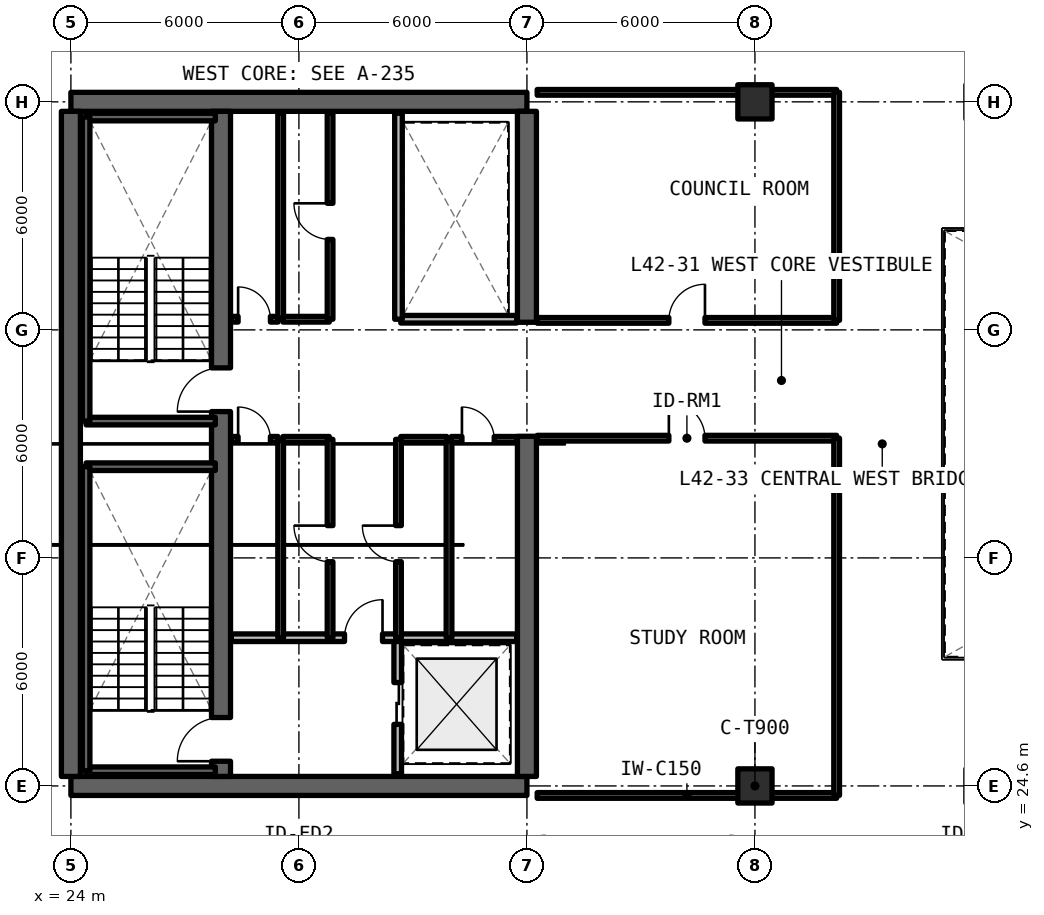
"""IFC4 building model, lengths in metres.
Left out: names, types, materials, properties, quantities, classifications, styles, units other than length and angle.
Written with IfcOpenShell. Run it as: python <this file> out.ifc"""

import sys

from ifc_helpers import new_model, si_unit, direction, frame, frame_2d, origin, origin_2d, place, context, subcontext, project, spatial, rectangle, extrude, element, fill, save


model = new_model("IFC4")
c1 = context("Model", 3, precision=1e-05, world=origin(), true_north=direction((0.0, 1.0)))
c2 = subcontext(c1, "Body", "Model", "MODEL_VIEW")
j1 = project(units=[si_unit("LENGTHUNIT", "METRE"), si_unit("PLANEANGLEUNIT", "RADIAN")], contexts=[c1])
p1 = place(None, origin())
s1 = spatial("IfcSite", under=j1, at=p1, CompositionType="ELEMENT")
p2 = place(p1, origin())
s2 = spatial("IfcBuilding", under=s1, at=p2, CompositionType="ELEMENT")
p3 = place(p2, frame((0.0, 0.0, 151.8)))
s3 = spatial("IfcBuildingStorey", under=s2, at=p3, CompositionType="ELEMENT", Elevation=151.8)
for number, where, z_axis, x_axis in (
    (1, (24.0, 24.6, 0.0), (0.0, 0.0, 1.0), (1.0, 0.0, 0.0)),
    (2, (36.0, 42.6, 0.0), (0.0, 0.0, 1.0), (-1.0, 0.0, 0.0)),
):
    element("IfcWall", number, at=place(p3, frame(where, z_axis=z_axis, x_axis=x_axis)), inside=s3, PredefinedType="SHEAR", context=c2, shape_type="SweptSolid", body=[
        extrude(rectangle(XDim=12.0, YDim=0.5, at=frame_2d((6.0, 0.0))), origin(), (0.0, 0.0, 1.0), 3.3),
    ])
p4 = place(p3, frame((24.0, 24.85, 0.0), z_axis=(0.0, 0.0, 1.0), x_axis=(0.0, 1.0, 0.0)))
e3 = element("IfcWall", 3, at=p4, inside=s3, PredefinedType="SHEAR", context=c2, shape_type="SweptSolid", body=[
    extrude(rectangle(XDim=17.5, YDim=0.5, at=frame_2d((8.75, 0.0))), origin(), (0.0, 0.0, 1.0), 3.3),
])
p5 = place(p3, frame((36.0, 24.85, 0.0), z_axis=(0.0, 0.0, 1.0), x_axis=(0.0, 1.0, 0.0)))
e4 = element("IfcWall", 4, at=p5, inside=s3, PredefinedType="SHEAR", context=c2, shape_type="SweptSolid", body=[
    extrude(rectangle(XDim=8.95, YDim=0.5, at=frame_2d((4.475, 0.0))), origin(), (0.0, 0.0, 1.0), 3.3),
])
p6 = place(p3, frame((36.0, 36.8, 0.0), z_axis=(0.0, 0.0, 1.0), x_axis=(0.0, 1.0, 0.0)))
e5 = element("IfcWall", 5, at=p6, inside=s3, PredefinedType="SHEAR", context=c2, shape_type="SweptSolid", body=[
    extrude(rectangle(XDim=5.55, YDim=0.5, at=frame_2d((2.775, 0.0))), origin(), (0.0, 0.0, 1.0), 3.3),
])
p7 = place(p3, frame((27.95, 24.85, 0.0), z_axis=(0.0, 0.0, 1.0), x_axis=(0.0, 1.0, 0.0)))
e6 = element("IfcWall", 6, at=p7, inside=s3, PredefinedType="SHEAR", context=c2, shape_type="SweptSolid", body=[
    extrude(rectangle(XDim=17.5, YDim=0.5, at=frame_2d((8.75, 0.0))), origin(), (0.0, 0.0, 1.0), 3.3),
])
p8 = place(p7, frame((0.4, 0.0, 0.0)))
e7 = element("IfcOpeningElement", 7, at=p8, cuts=e6, PredefinedType="OPENING", context=c2, shape_type="SweptSolid", body=[
    extrude(rectangle(XDim=1.15, YDim=2.15, at=frame_2d((0.575, 1.075))), frame((0.0, 0.26, 0.0), z_axis=(0.0, -1.0, 0.0), x_axis=(1.0, 0.0, 0.0)), (0.0, 0.0, 1.0), 0.52),
])
p9 = place(p7, frame((9.6, 0.0, 0.0)))
e8 = element("IfcOpeningElement", 8, at=p9, cuts=e6, PredefinedType="OPENING", context=c2, shape_type="SweptSolid", body=[
    extrude(rectangle(XDim=1.15, YDim=2.15, at=frame_2d((0.575, 1.075))), frame((0.0, 0.26, 0.0), z_axis=(0.0, -1.0, 0.0), x_axis=(1.0, 0.0, 0.0)), (0.0, 0.0, 1.0), 0.52),
])
for number, where, z_axis, x_axis in (
    (9, (42.0, 24.6, 0.0), (0.0, 0.0, 1.0), (1.0, 0.0, 0.0)),
    (10, (42.0, 42.6, 0.0), (0.0, 0.0, 1.0), (1.0, 0.0, 0.0)),
):
    element("IfcColumn", number, at=place(p3, frame(where, z_axis=z_axis, x_axis=x_axis)), inside=s3, PredefinedType="COLUMN", context=c2, shape_type="SweptSolid", body=[
        extrude(rectangle(XDim=0.9, YDim=0.9, at=origin_2d()), origin(), (0.0, 0.0, 1.0), 3.3),
    ])
p10 = place(p3, frame((32.6, 24.92, 0.0), z_axis=(0.0, 0.0, 1.0), x_axis=(0.0, 1.0, 0.0)))
e11 = element("IfcWall", 11, at=p10, inside=s3, PredefinedType="SOLIDWALL", context=c2, shape_type="SweptSolid", body=[
    extrude(rectangle(XDim=3.58, YDim=0.2, at=frame_2d((1.79, 0.0))), origin(), (0.0, 0.0, 1.0), 2.35),
])
p11 = place(p10, frame((1.3, 0.0, 0.0)))
e12 = element("IfcOpeningElement", 12, at=p11, cuts=e11, PredefinedType="OPENING", context=c2, shape_type="SweptSolid", body=[
    extrude(rectangle(XDim=1.1, YDim=2.2, at=frame_2d((0.55, 1.1))), frame((0.0, 0.11, 0.0), z_axis=(0.0, -1.0, 0.0), x_axis=(1.0, 0.0, 0.0)), (0.0, 0.0, 1.0), 0.22),
])
p12 = place(p3, frame((28.22, 28.5, 0.0), z_axis=(0.0, 0.0, 1.0), x_axis=(1.0, 0.0, 0.0)))
e13 = element("IfcWall", 13, at=p12, inside=s3, PredefinedType="SOLIDWALL", context=c2, shape_type="SweptSolid", body=[
    extrude(rectangle(XDim=7.51, YDim=0.2, at=frame_2d((3.755, 0.0))), origin(), (0.0, 0.0, 1.0), 2.35),
])
p13 = place(p12, frame((2.98, 0.0, 0.0)))
e14 = element("IfcOpeningElement", 14, at=p13, cuts=e13, PredefinedType="OPENING", context=c2, shape_type="SweptSolid", body=[
    extrude(rectangle(XDim=1.0, YDim=2.15, at=frame_2d((0.5, 1.075))), frame((0.0, 0.11, 0.0), z_axis=(0.0, -1.0, 0.0), x_axis=(1.0, 0.0, 0.0)), (0.0, 0.0, 1.0), 0.22),
])
p14 = place(p3, frame((29.52, 28.5, 0.0), z_axis=(0.0, 0.0, 1.0), x_axis=(0.0, 1.0, 0.0)))
e15 = element("IfcWall", 15, at=p14, inside=s3, PredefinedType="SOLIDWALL", context=c2, shape_type="SweptSolid", body=[
    extrude(rectangle(XDim=5.22, YDim=0.15, at=frame_2d((2.61, 0.0))), origin(), (0.0, 0.0, 1.0), 2.35),
])
p15 = place(p3, frame((28.22, 33.72, 0.0), z_axis=(0.0, 0.0, 1.0), x_axis=(1.0, 0.0, 0.0)))
e16 = element("IfcWall", 16, at=p15, inside=s3, PredefinedType="SOLIDWALL", context=c2, shape_type="SweptSolid", body=[
    extrude(rectangle(XDim=1.23, YDim=0.15, at=frame_2d((0.615, 0.0))), origin(), (0.0, 0.0, 1.0), 2.35),
])
p16 = place(p15, frame((0.18, 0.0, 0.0)))
e17 = element("IfcOpeningElement", 17, at=p16, cuts=e16, PredefinedType="OPENING", context=c2, shape_type="SweptSolid", body=[
    extrude(rectangle(XDim=0.85, YDim=2.1, at=frame_2d((0.425, 1.05))), frame((0.0, 0.085, 0.0), z_axis=(0.0, -1.0, 0.0), x_axis=(1.0, 0.0, 0.0)), (0.0, 0.0, 1.0), 0.17),
])
p17 = place(p3, frame((29.58, 33.72, 0.0), z_axis=(0.0, 0.0, 1.0), x_axis=(1.0, 0.0, 0.0)))
e18 = element("IfcWall", 18, at=p17, inside=s3, PredefinedType="SOLIDWALL", context=c2, shape_type="SweptSolid", body=[
    extrude(rectangle(XDim=1.22, YDim=0.15, at=frame_2d((0.61, 0.0))), origin(), (0.0, 0.0, 1.0), 2.35),
])
p18 = place(p3, frame((30.82, 28.5, 0.0), z_axis=(0.0, 0.0, 1.0), x_axis=(0.0, 1.0, 0.0)))
e19 = element("IfcWall", 19, at=p18, inside=s3, PredefinedType="SOLIDWALL", context=c2, shape_type="SweptSolid", body=[
    extrude(rectangle(XDim=5.22, YDim=0.15, at=frame_2d((2.61, 0.0))), origin(), (0.0, 0.0, 1.0), 2.35),
])
p19 = place(p18, frame((2.0, 0.0, 0.0)))
e20 = element("IfcOpeningElement", 20, at=p19, cuts=e19, PredefinedType="OPENING", context=c2, shape_type="SweptSolid", body=[
    extrude(rectangle(XDim=0.95, YDim=2.15, at=frame_2d((0.475, 1.075))), frame((0.0, 0.085, 0.0), z_axis=(0.0, -1.0, 0.0), x_axis=(1.0, 0.0, 0.0)), (0.0, 0.0, 1.0), 0.17),
])
p20 = place(p3, frame((33.95, 28.5, 0.0), z_axis=(0.0, 0.0, 1.0), x_axis=(0.0, 1.0, 0.0)))
e21 = element("IfcWall", 21, at=p20, inside=s3, PredefinedType="SOLIDWALL", context=c2, shape_type="SweptSolid", body=[
    extrude(rectangle(XDim=5.22, YDim=0.15, at=frame_2d((2.61, 0.0))), origin(), (0.0, 0.0, 1.0), 2.35),
])
p21 = place(p3, frame((32.68, 33.72, 0.0), z_axis=(0.0, 0.0, 1.0), x_axis=(1.0, 0.0, 0.0)))
e22 = element("IfcWall", 22, at=p21, inside=s3, PredefinedType="SOLIDWALL", context=c2, shape_type="SweptSolid", body=[
    extrude(rectangle(XDim=1.21, YDim=0.15, at=frame_2d((0.605, 0.0))), origin(), (0.0, 0.0, 1.0), 2.35),
])
p22 = place(p3, frame((34.01, 33.72, 0.0), z_axis=(0.0, 0.0, 1.0), x_axis=(1.0, 0.0, 0.0)))
e23 = element("IfcWall", 23, at=p22, inside=s3, PredefinedType="SOLIDWALL", context=c2, shape_type="SweptSolid", body=[
    extrude(rectangle(XDim=1.72, YDim=0.15, at=frame_2d((0.86, 0.0))), origin(), (0.0, 0.0, 1.0), 2.35),
])
p23 = place(p22, frame((0.28, 0.0, 0.0)))
e24 = element("IfcOpeningElement", 24, at=p23, cuts=e23, PredefinedType="OPENING", context=c2, shape_type="SweptSolid", body=[
    extrude(rectangle(XDim=0.85, YDim=2.1, at=frame_2d((0.425, 1.05))), frame((0.0, 0.085, 0.0), z_axis=(0.0, -1.0, 0.0), x_axis=(1.0, 0.0, 0.0)), (0.0, 0.0, 1.0), 0.17),
])
p24 = place(p3, frame((32.62, 28.5, 0.0), z_axis=(0.0, 0.0, 1.0), x_axis=(0.0, 1.0, 0.0)))
e25 = element("IfcWall", 25, at=p24, inside=s3, PredefinedType="SOLIDWALL", context=c2, shape_type="SweptSolid", body=[
    extrude(rectangle(XDim=5.22, YDim=0.15, at=frame_2d((2.61, 0.0))), origin(), (0.0, 0.0, 1.0), 2.35),
])
p25 = place(p24, frame((2.0, 0.0, 0.0)))
e26 = element("IfcOpeningElement", 26, at=p25, cuts=e25, PredefinedType="OPENING", context=c2, shape_type="SweptSolid", body=[
    extrude(rectangle(XDim=0.95, YDim=2.15, at=frame_2d((0.475, 1.075))), frame((0.0, 0.085, 0.0), z_axis=(0.0, -1.0, 0.0), x_axis=(1.0, 0.0, 0.0)), (0.0, 0.0, 1.0), 0.17),
])
p26 = place(p3, frame((29.52, 36.88, 0.0), z_axis=(0.0, 0.0, 1.0), x_axis=(0.0, 1.0, 0.0)))
e27 = element("IfcWall", 27, at=p26, inside=s3, PredefinedType="SOLIDWALL", context=c2, shape_type="SweptSolid", body=[
    extrude(rectangle(XDim=5.42, YDim=0.15, at=frame_2d((2.71, 0.0))), origin(), (0.0, 0.0, 1.0), 2.35),
])
p27 = place(p3, frame((28.22, 36.88, 0.0), z_axis=(0.0, 0.0, 1.0), x_axis=(1.0, 0.0, 0.0)))
e28 = element("IfcWall", 28, at=p27, inside=s3, PredefinedType="SOLIDWALL", context=c2, shape_type="SweptSolid", body=[
    extrude(rectangle(XDim=1.23, YDim=0.15, at=frame_2d((0.615, 0.0))), origin(), (0.0, 0.0, 1.0), 2.35),
])
p28 = place(p27, frame((0.18, 0.0, 0.0)))
e29 = element("IfcOpeningElement", 29, at=p28, cuts=e28, PredefinedType="OPENING", context=c2, shape_type="SweptSolid", body=[
    extrude(rectangle(XDim=0.85, YDim=2.1, at=frame_2d((0.425, 1.05))), frame((0.0, 0.085, 0.0), z_axis=(0.0, -1.0, 0.0), x_axis=(1.0, 0.0, 0.0)), (0.0, 0.0, 1.0), 0.17),
])
p29 = place(p3, frame((29.58, 36.88, 0.0), z_axis=(0.0, 0.0, 1.0), x_axis=(1.0, 0.0, 0.0)))
e30 = element("IfcWall", 30, at=p29, inside=s3, PredefinedType="SOLIDWALL", context=c2, shape_type="SweptSolid", body=[
    extrude(rectangle(XDim=1.22, YDim=0.15, at=frame_2d((0.61, 0.0))), origin(), (0.0, 0.0, 1.0), 2.35),
])
p30 = place(p3, frame((30.82, 36.88, 0.0), z_axis=(0.0, 0.0, 1.0), x_axis=(0.0, 1.0, 0.0)))
e31 = element("IfcWall", 31, at=p30, inside=s3, PredefinedType="SOLIDWALL", context=c2, shape_type="SweptSolid", body=[
    extrude(rectangle(XDim=5.42, YDim=0.15, at=frame_2d((2.71, 0.0))), origin(), (0.0, 0.0, 1.0), 2.35),
])
p31 = place(p30, frame((2.1, 0.0, 0.0)))
e32 = element("IfcOpeningElement", 32, at=p31, cuts=e31, PredefinedType="OPENING", context=c2, shape_type="SweptSolid", body=[
    extrude(rectangle(XDim=0.95, YDim=2.15, at=frame_2d((0.475, 1.075))), frame((0.0, 0.085, 0.0), z_axis=(0.0, -1.0, 0.0), x_axis=(1.0, 0.0, 0.0)), (0.0, 0.0, 1.0), 0.17),
])
p32 = place(p3, frame((32.68, 36.88, 0.0), z_axis=(0.0, 0.0, 1.0), x_axis=(1.0, 0.0, 0.0)))
e33 = element("IfcWall", 33, at=p32, inside=s3, PredefinedType="SOLIDWALL", context=c2, shape_type="SweptSolid", body=[
    extrude(rectangle(XDim=3.05, YDim=0.2, at=frame_2d((1.525, 0.0))), origin(), (0.0, 0.0, 1.0), 2.35),
])
p33 = place(p3, frame((32.62, 36.88, 0.0), z_axis=(0.0, 0.0, 1.0), x_axis=(0.0, 1.0, 0.0)))
e34 = element("IfcWall", 34, at=p33, inside=s3, PredefinedType="SOLIDWALL", context=c2, shape_type="SweptSolid", body=[
    extrude(rectangle(XDim=5.42, YDim=0.2, at=frame_2d((2.71, 0.0))), origin(), (0.0, 0.0, 1.0), 2.35),
])
p34 = place(p3, frame((36.27, 24.35, 0.0), z_axis=(0.0, 0.0, 1.0), x_axis=(1.0, 0.0, 0.0)))
e35 = element("IfcWall", 35, at=p34, inside=s3, PredefinedType="SOLIDWALL", context=c2, shape_type="SweptSolid", body=[
    extrude(rectangle(XDim=7.88, YDim=0.15, at=frame_2d((3.94, 0.0))), origin(), (0.0, 0.0, 1.0), 2.35),
])
p35 = place(p3, frame((36.27, 33.75, 0.0), z_axis=(0.0, 0.0, 1.0), x_axis=(1.0, 0.0, 0.0)))
e36 = element("IfcWall", 36, at=p35, inside=s3, PredefinedType="SOLIDWALL", context=c2, shape_type="SweptSolid", body=[
    extrude(rectangle(XDim=7.88, YDim=0.15, at=frame_2d((3.94, 0.0))), origin(), (0.0, 0.0, 1.0), 2.35),
])
p36 = place(p35, frame((3.465, 0.0, 0.0)))
e37 = element("IfcOpeningElement", 37, at=p36, cuts=e36, PredefinedType="OPENING", context=c2, shape_type="SweptSolid", body=[
    extrude(rectangle(XDim=0.95, YDim=2.15, at=frame_2d((0.475, 1.075))), frame((0.0, 0.085, 0.0), z_axis=(0.0, -1.0, 0.0), x_axis=(1.0, 0.0, 0.0)), (0.0, 0.0, 1.0), 0.17),
])
p37 = place(p3, frame((44.15, 24.35, 0.0), z_axis=(0.0, 0.0, 1.0), x_axis=(0.0, 1.0, 0.0)))
e38 = element("IfcWall", 38, at=p37, inside=s3, PredefinedType="SOLIDWALL", context=c2, shape_type="SweptSolid", body=[
    extrude(rectangle(XDim=9.4, YDim=0.15, at=frame_2d((4.7, 0.0))), origin(), (0.0, 0.0, 1.0), 2.35),
])
p38 = place(p3, frame((36.27, 36.85, 0.0), z_axis=(0.0, 0.0, 1.0), x_axis=(1.0, 0.0, 0.0)))
e39 = element("IfcWall", 39, at=p38, inside=s3, PredefinedType="SOLIDWALL", context=c2, shape_type="SweptSolid", body=[
    extrude(rectangle(XDim=7.88, YDim=0.15, at=frame_2d((3.94, 0.0))), origin(), (0.0, 0.0, 1.0), 2.35),
])
p39 = place(p38, frame((3.465, 0.0, 0.0)))
e40 = element("IfcOpeningElement", 40, at=p39, cuts=e39, PredefinedType="OPENING", context=c2, shape_type="SweptSolid", body=[
    extrude(rectangle(XDim=0.95, YDim=2.15, at=frame_2d((0.475, 1.075))), frame((0.0, 0.085, 0.0), z_axis=(0.0, -1.0, 0.0), x_axis=(1.0, 0.0, 0.0)), (0.0, 0.0, 1.0), 0.17),
])
p40 = place(p3, frame((36.27, 42.85, 0.0), z_axis=(0.0, 0.0, 1.0), x_axis=(1.0, 0.0, 0.0)))
e41 = element("IfcWall", 41, at=p40, inside=s3, PredefinedType="SOLIDWALL", context=c2, shape_type="SweptSolid", body=[
    extrude(rectangle(XDim=7.88, YDim=0.15, at=frame_2d((3.94, 0.0))), origin(), (0.0, 0.0, 1.0), 2.35),
])
p41 = place(p3, frame((44.15, 36.85, 0.0), z_axis=(0.0, 0.0, 1.0), x_axis=(0.0, 1.0, 0.0)))
e42 = element("IfcWall", 42, at=p41, inside=s3, PredefinedType="SOLIDWALL", context=c2, shape_type="SweptSolid", body=[
    extrude(rectangle(XDim=6.0, YDim=0.15, at=frame_2d((3.0, 0.0))), origin(), (0.0, 0.0, 1.0), 2.35),
])
for number, where, z_axis, x_axis in (
    (43, (24.4, 25.0, 0.0), (0.0, 0.0, 1.0), (1.0, 0.0, 0.0)),
    (44, (27.8, 33.0, 0.0), (0.0, 0.0, 1.0), (-1.0, 0.0, 0.0)),
):
    element("IfcWall", number, at=place(p3, frame(where, z_axis=z_axis, x_axis=x_axis)), inside=s3, PredefinedType="SOLIDWALL", context=c2, shape_type="SweptSolid", body=[
        extrude(rectangle(XDim=3.4, YDim=0.2, at=frame_2d((1.7, 0.0))), origin(), (0.0, 0.0, 1.0), 3.3),
    ])
p42 = place(p3, frame((24.4, 33.0, 0.0), z_axis=(0.0, 0.0, 1.0), x_axis=(0.0, -1.0, 0.0)))
e45 = element("IfcWall", 45, at=p42, inside=s3, PredefinedType="SOLIDWALL", context=c2, shape_type="SweptSolid", body=[
    extrude(rectangle(XDim=8.0, YDim=0.2, at=frame_2d((4.0, 0.0))), origin(), (0.0, 0.0, 1.0), 3.3),
])
for number, where, z_axis, x_axis in (
    (46, (24.4, 34.2, 0.0), (0.0, 0.0, 1.0), (1.0, 0.0, 0.0)),
    (47, (27.8, 42.2, 0.0), (0.0, 0.0, 1.0), (-1.0, 0.0, 0.0)),
):
    element("IfcWall", number, at=place(p3, frame(where, z_axis=z_axis, x_axis=x_axis)), inside=s3, PredefinedType="SOLIDWALL", context=c2, shape_type="SweptSolid", body=[
        extrude(rectangle(XDim=3.4, YDim=0.2, at=frame_2d((1.7, 0.0))), origin(), (0.0, 0.0, 1.0), 3.3),
    ])
p43 = place(p3, frame((24.4, 42.2, 0.0), z_axis=(0.0, 0.0, 1.0), x_axis=(0.0, -1.0, 0.0)))
e48 = element("IfcWall", 48, at=p43, inside=s3, PredefinedType="SOLIDWALL", context=c2, shape_type="SweptSolid", body=[
    extrude(rectangle(XDim=8.0, YDim=0.2, at=frame_2d((4.0, 0.0))), origin(), (0.0, 0.0, 1.0), 3.3),
])
p44 = place(p11, origin())
e49 = element("IfcDoor", 49, at=p44, inside=s3, OperationType="SLIDING_TO_LEFT", PredefinedType="DOOR", context=c2, shape_type="SweptSolid", body=[
    extrude(rectangle(XDim=1.1, YDim=2.2, at=frame_2d((0.55, 1.1))), frame((0.0, 0.025, 0.0), z_axis=(0.0, -1.0, 0.0), x_axis=(1.0, 0.0, 0.0)), (0.0, 0.0, 1.0), 0.05),
])
fill(e12, e49)
p45 = place(p13, origin())
e50 = element("IfcDoor", 50, at=p45, inside=s3, OperationType="SINGLE_SWING_RIGHT", PredefinedType="DOOR", context=c2, shape_type="SweptSolid", body=[
    extrude(rectangle(XDim=1.0, YDim=2.15, at=frame_2d((0.5, 1.075))), frame((0.0, 0.025, 0.0), z_axis=(0.0, -1.0, 0.0), x_axis=(1.0, 0.0, 0.0)), (0.0, 0.0, 1.0), 0.05),
])
fill(e14, e50)
p46 = place(p16, origin())
e51 = element("IfcDoor", 51, at=p46, inside=s3, OperationType="SINGLE_SWING_LEFT", PredefinedType="DOOR", context=c2, shape_type="SweptSolid", body=[
    extrude(rectangle(XDim=0.85, YDim=2.1, at=frame_2d((0.425, 1.05))), frame((0.0, 0.025, 0.0), z_axis=(0.0, -1.0, 0.0), x_axis=(1.0, 0.0, 0.0)), (0.0, 0.0, 1.0), 0.05),
])
fill(e17, e51)
p47 = place(p19, origin())
e52 = element("IfcDoor", 52, at=p47, inside=s3, OperationType="SINGLE_SWING_RIGHT", PredefinedType="DOOR", context=c2, shape_type="SweptSolid", body=[
    extrude(rectangle(XDim=0.95, YDim=2.15, at=frame_2d((0.475, 1.075))), frame((0.0, 0.025, 0.0), z_axis=(0.0, -1.0, 0.0), x_axis=(1.0, 0.0, 0.0)), (0.0, 0.0, 1.0), 0.05),
])
fill(e20, e52)
p48 = place(p23, origin())
e53 = element("IfcDoor", 53, at=p48, inside=s3, OperationType="SINGLE_SWING_LEFT", PredefinedType="DOOR", context=c2, shape_type="SweptSolid", body=[
    extrude(rectangle(XDim=0.85, YDim=2.1, at=frame_2d((0.425, 1.05))), frame((0.0, 0.025, 0.0), z_axis=(0.0, -1.0, 0.0), x_axis=(1.0, 0.0, 0.0)), (0.0, 0.0, 1.0), 0.05),
])
fill(e24, e53)
p49 = place(p25, origin())
e54 = element("IfcDoor", 54, at=p49, inside=s3, OperationType="SINGLE_SWING_RIGHT", PredefinedType="DOOR", context=c2, shape_type="SweptSolid", body=[
    extrude(rectangle(XDim=0.95, YDim=2.15, at=frame_2d((0.475, 1.075))), frame((0.0, 0.025, 0.0), z_axis=(0.0, -1.0, 0.0), x_axis=(1.0, 0.0, 0.0)), (0.0, 0.0, 1.0), 0.05),
])
fill(e26, e54)
p50 = place(p28, origin())
e55 = element("IfcDoor", 55, at=p50, inside=s3, OperationType="SINGLE_SWING_LEFT", PredefinedType="DOOR", context=c2, shape_type="SweptSolid", body=[
    extrude(rectangle(XDim=0.85, YDim=2.1, at=frame_2d((0.425, 1.05))), frame((0.0, 0.025, 0.0), z_axis=(0.0, -1.0, 0.0), x_axis=(1.0, 0.0, 0.0)), (0.0, 0.0, 1.0), 0.05),
])
fill(e29, e55)
p51 = place(p31, origin())
e56 = element("IfcDoor", 56, at=p51, inside=s3, OperationType="SINGLE_SWING_RIGHT", PredefinedType="DOOR", context=c2, shape_type="SweptSolid", body=[
    extrude(rectangle(XDim=0.95, YDim=2.15, at=frame_2d((0.475, 1.075))), frame((0.0, 0.025, 0.0), z_axis=(0.0, -1.0, 0.0), x_axis=(1.0, 0.0, 0.0)), (0.0, 0.0, 1.0), 0.05),
])
fill(e32, e56)
p52 = place(p36, origin())
e57 = element("IfcDoor", 57, at=p52, inside=s3, OperationType="SINGLE_SWING_LEFT", PredefinedType="DOOR", context=c2, shape_type="SweptSolid", body=[
    extrude(rectangle(XDim=0.95, YDim=2.15, at=frame_2d((0.475, 1.075))), frame((0.0, 0.025, 0.0), z_axis=(0.0, -1.0, 0.0), x_axis=(1.0, 0.0, 0.0)), (0.0, 0.0, 1.0), 0.05),
])
fill(e37, e57)
p53 = place(p39, origin())
e58 = element("IfcDoor", 58, at=p53, inside=s3, OperationType="SINGLE_SWING_RIGHT", PredefinedType="DOOR", context=c2, shape_type="SweptSolid", body=[
    extrude(rectangle(XDim=0.95, YDim=2.15, at=frame_2d((0.475, 1.075))), frame((0.0, 0.025, 0.0), z_axis=(0.0, -1.0, 0.0), x_axis=(1.0, 0.0, 0.0)), (0.0, 0.0, 1.0), 0.05),
])
fill(e40, e58)
p54 = place(p8, origin())
e59 = element("IfcDoor", 59, at=p54, inside=s3, OperationType="SINGLE_SWING_RIGHT", PredefinedType="DOOR", context=c2, shape_type="SweptSolid", body=[
    extrude(rectangle(XDim=1.15, YDim=2.15, at=frame_2d((0.575, 1.075))), frame((0.0, 0.025, 0.0), z_axis=(0.0, -1.0, 0.0), x_axis=(1.0, 0.0, 0.0)), (0.0, 0.0, 1.0), 0.05),
])
fill(e7, e59)
p55 = place(p9, origin())
e60 = element("IfcDoor", 60, at=p55, inside=s3, OperationType="SINGLE_SWING_LEFT", PredefinedType="DOOR", context=c2, shape_type="SweptSolid", body=[
    extrude(rectangle(XDim=1.15, YDim=2.15, at=frame_2d((0.575, 1.075))), frame((0.0, 0.025, 0.0), z_axis=(0.0, -1.0, 0.0), x_axis=(1.0, 0.0, 0.0)), (0.0, 0.0, 1.0), 0.05),
])
fill(e8, e60)
save(model, sys.argv[1])
